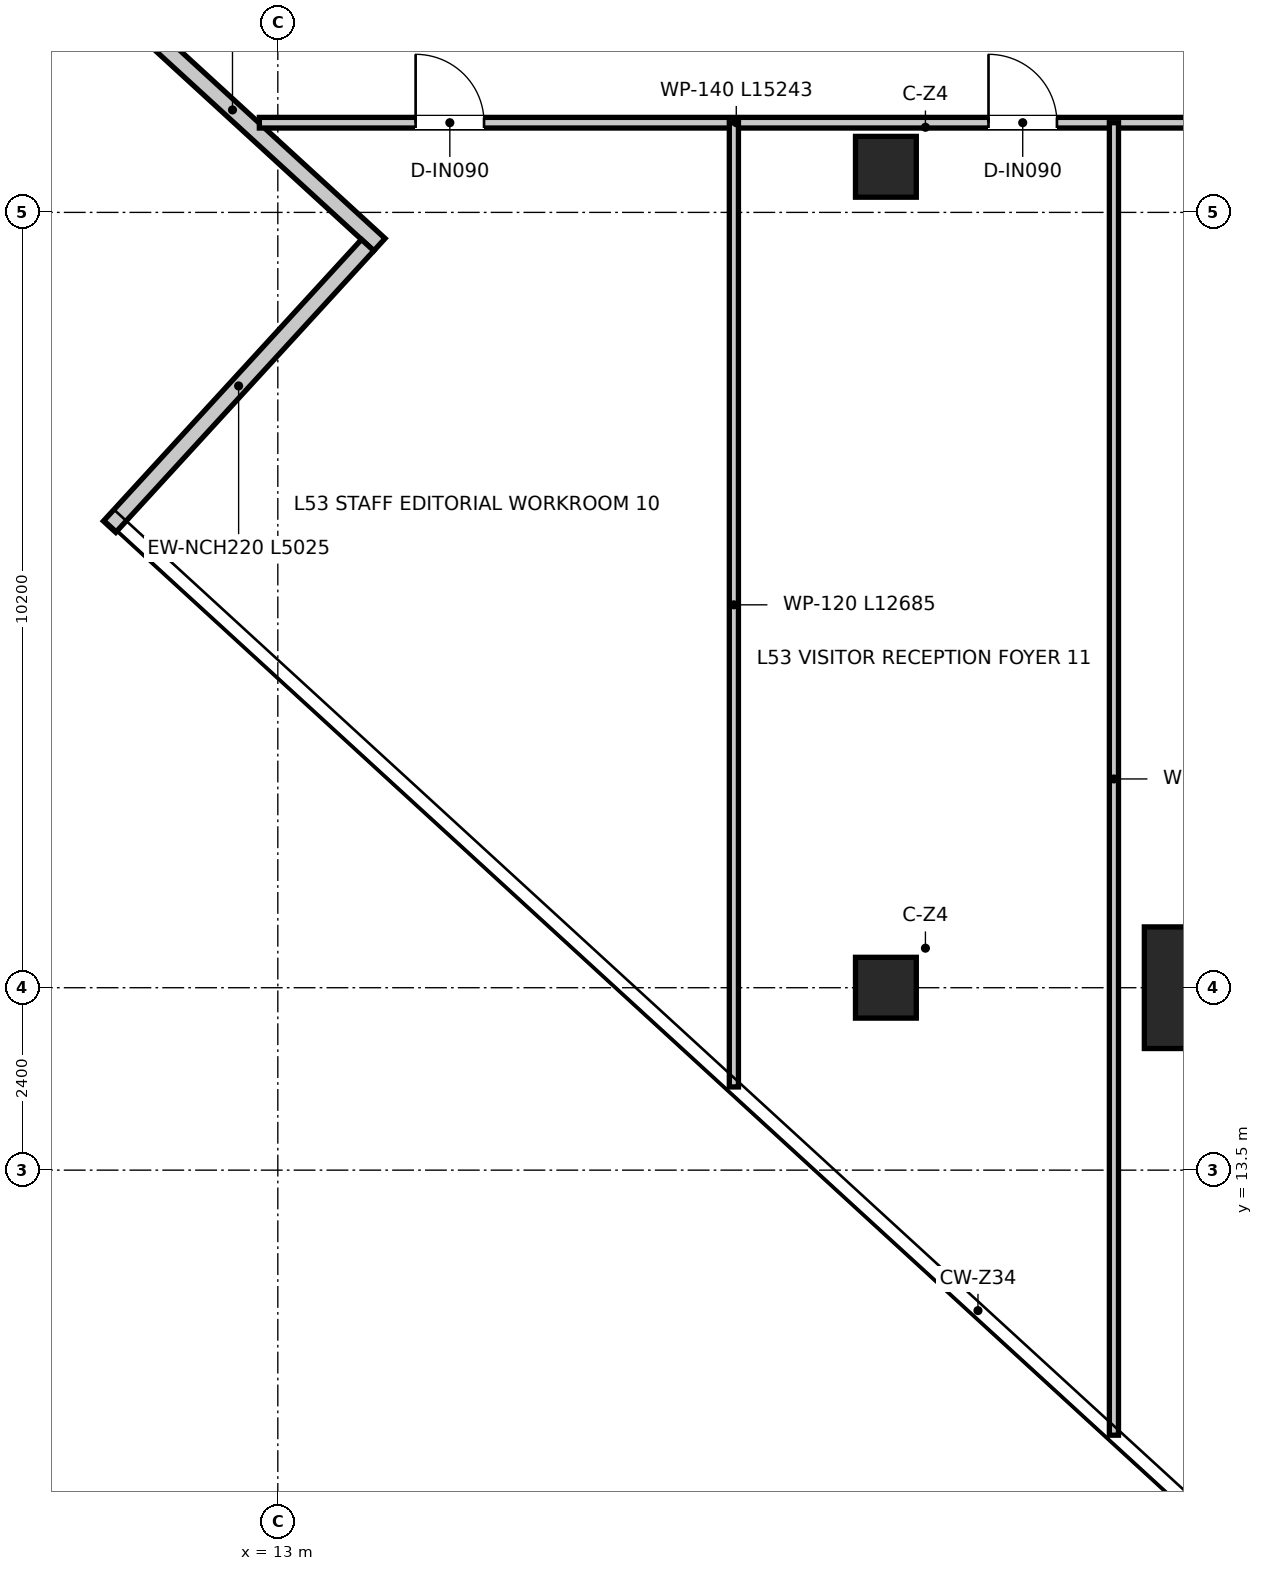
"""IFC4 building model, lengths in metres.
Left out: names, types, materials, properties, quantities, classifications, styles, units other than length and angle.
Written with IfcOpenShell. Run it as: python <this file> out.ifc"""

import sys

from ifc_helpers import new_model, si_unit, direction, frame, frame_2d, origin, origin_2d, place, context, subcontext, project, spatial, rectangle, extrude, source, transform, mapped, element, fill, save


model = new_model("IFC4")
c1 = context("Model", 3, precision=1e-05, world=origin(), true_north=direction((0.0, 1.0)))
c2 = subcontext(c1, "Body", "Model", "MODEL_VIEW")
j1 = project(units=[si_unit("LENGTHUNIT", "METRE"), si_unit("PLANEANGLEUNIT", "RADIAN")], contexts=[c1])
p1 = place(None, origin())
s1 = spatial("IfcSite", under=j1, at=p1, CompositionType="ELEMENT")
p2 = place(p1, origin())
s2 = spatial("IfcBuilding", under=s1, at=p2, CompositionType="ELEMENT")
p3 = place(p2, frame((0.0, 0.0, 219.15)))
s3 = spatial("IfcBuildingStorey", under=s2, at=p3, CompositionType="ELEMENT", Elevation=219.15)
m1 = source(origin(), c2, "Body", "SweptSolid", [
    extrude(rectangle(XDim=1.6, YDim=1.6, at=origin_2d()), origin(), (0.0, 0.0, 1.0), 3.95),
])
p4 = place(p3, frame((25.2, 15.9, 0.0), z_axis=(0.0, 0.0, 1.0), x_axis=(1.0, 0.0, 0.0)))
e1 = element("IfcColumn", 1, at=p4, inside=s3, PredefinedType="USERDEFINED", context=c2, shape_type="MappedRepresentation", body=[
    mapped(m1, transform((0.0, 0.0, 0.0), x_axis=(1.0, 0.0, 0.0), y_axis=(0.0, 1.0, 0.0), z_axis=(0.0, 0.0, 1.0), scale=1.0)),
])
m2 = source(origin(), c2, "Body", "SweptSolid", [
    extrude(rectangle(XDim=0.8, YDim=0.8, at=origin_2d()), origin(), (0.0, 0.0, 1.0), 3.95),
])
for number, where, z_axis, x_axis in (
    (2, (21.0, 15.9, 0.0), (0.0, 0.0, 1.0), (1.0, 0.0, 0.0)),
    (3, (21.0, 26.7, 0.0), (0.0, 0.0, 1.0), (1.0, 0.0, 0.0)),
):
    element("IfcColumn", number, at=place(p3, frame(where, z_axis=z_axis, x_axis=x_axis)), inside=s3, PredefinedType="COLUMN", context=c2, shape_type="MappedRepresentation", body=[
        mapped(m2, transform((0.0, 0.0, 0.0), x_axis=(1.0, 0.0, 0.0), y_axis=(0.0, 1.0, 0.0), z_axis=(0.0, 0.0, 1.0), scale=1.0)),
    ])
p5 = place(p3, frame((10.47, 29.22, 0.0), z_axis=(0.0, 0.0, 1.0), x_axis=(0.737293236511, -0.675572855727, 0.0)))
e4 = element("IfcWall", 4, at=p5, inside=s3, PredefinedType="ELEMENTEDWALL", context=c2, shape_type="SweptSolid", body=[
    extrude(rectangle(XDim=5.245, YDim=0.22, at=frame_2d((2.623, 0.0))), origin(), (0.0, 0.0, 1.0), 3.67),
])
p6 = place(p3, frame((14.182, 25.669, 0.0), z_axis=(0.0, 0.0, 1.0), x_axis=(-0.675581609375, -0.737285215553, 0.0)))
e5 = element("IfcWall", 5, at=p6, inside=s3, PredefinedType="ELEMENTEDWALL", context=c2, shape_type="SweptSolid", body=[
    extrude(rectangle(XDim=5.025, YDim=0.22, at=frame_2d((2.512, 0.0))), origin(), (0.0, 0.0, 1.0), 3.67),
])
p7 = place(p3, frame((12.757, 27.28, 0.0), z_axis=(0.0, 0.0, 1.0), x_axis=(1.0, 0.0, 0.0)))
e6 = element("IfcWall", 6, at=p7, inside=s3, PredefinedType="PARTITIONING", context=c2, shape_type="SweptSolid", body=[
    extrude(rectangle(XDim=15.243, YDim=0.14, at=frame_2d((7.622, 0.0))), origin(), (0.0, 0.0, 1.0), 3.03),
])
p8 = place(p7, frame((2.056, 0.0, 0.0)))
e7 = element("IfcOpeningElement", 7, at=p8, cuts=e6, PredefinedType="OPENING", context=c2, shape_type="SweptSolid", body=[
    extrude(rectangle(XDim=0.9, YDim=2.1, at=frame_2d((0.45, 1.05))), frame((0.0, 0.08, 0.0), z_axis=(0.0, -1.0, 0.0), x_axis=(1.0, 0.0, 0.0)), (0.0, 0.0, 1.0), 0.16),
])
p9 = place(p7, frame((9.593, 0.0, 0.0)))
e8 = element("IfcOpeningElement", 8, at=p9, cuts=e6, PredefinedType="OPENING", context=c2, shape_type="SweptSolid", body=[
    extrude(rectangle(XDim=0.9, YDim=2.1, at=frame_2d((0.45, 1.05))), frame((0.0, 0.08, 0.0), z_axis=(0.0, -1.0, 0.0), x_axis=(1.0, 0.0, 0.0)), (0.0, 0.0, 1.0), 0.16),
])
p10 = place(p7, frame((12.493, 0.0, 0.0)))
e9 = element("IfcOpeningElement", 9, at=p10, cuts=e6, PredefinedType="OPENING", context=c2, shape_type="SweptSolid", body=[
    extrude(rectangle(XDim=0.9, YDim=2.1, at=frame_2d((0.45, 1.05))), frame((0.0, 0.08, 0.0), z_axis=(0.0, -1.0, 0.0), x_axis=(1.0, 0.0, 0.0)), (0.0, 0.0, 1.0), 0.16),
])
p11 = place(p3, frame((19.0, 14.595, 0.0), z_axis=(0.0, 0.0, 1.0), x_axis=(0.0, 1.0, 0.0)))
e10 = element("IfcWall", 10, at=p11, inside=s3, PredefinedType="PARTITIONING", context=c2, shape_type="SweptSolid", body=[
    extrude(rectangle(XDim=12.685, YDim=0.12, at=frame_2d((6.343, 0.0))), origin(), (0.0, 0.0, 1.0), 3.67),
])
p12 = place(p3, frame((24.0, 10.013, 0.0), z_axis=(0.0, 0.0, 1.0), x_axis=(0.0, 1.0, 0.0)))
e11 = element("IfcWall", 11, at=p12, inside=s3, PredefinedType="PARTITIONING", context=c2, shape_type="SweptSolid", body=[
    extrude(rectangle(XDim=17.267, YDim=0.12, at=frame_2d((8.634, 0.0))), origin(), (0.0, 0.0, 1.0), 3.18),
])
p13 = place(p8, origin())
e12 = element("IfcDoor", 12, at=p13, inside=s3, OperationType="SINGLE_SWING_LEFT", PredefinedType="DOOR", context=c2, shape_type="SweptSolid", body=[
    extrude(rectangle(XDim=0.9, YDim=2.1, at=frame_2d((0.45, 1.05))), frame((0.0, 0.025, 0.0), z_axis=(0.0, -1.0, 0.0), x_axis=(1.0, 0.0, 0.0)), (0.0, 0.0, 1.0), 0.05),
])
fill(e7, e12)
p14 = place(p9, origin())
e13 = element("IfcDoor", 13, at=p14, inside=s3, OperationType="SINGLE_SWING_LEFT", PredefinedType="DOOR", context=c2, shape_type="SweptSolid", body=[
    extrude(rectangle(XDim=0.9, YDim=2.1, at=frame_2d((0.45, 1.05))), frame((0.0, 0.025, 0.0), z_axis=(0.0, -1.0, 0.0), x_axis=(1.0, 0.0, 0.0)), (0.0, 0.0, 1.0), 0.05),
])
fill(e8, e13)
save(model, sys.argv[1])
